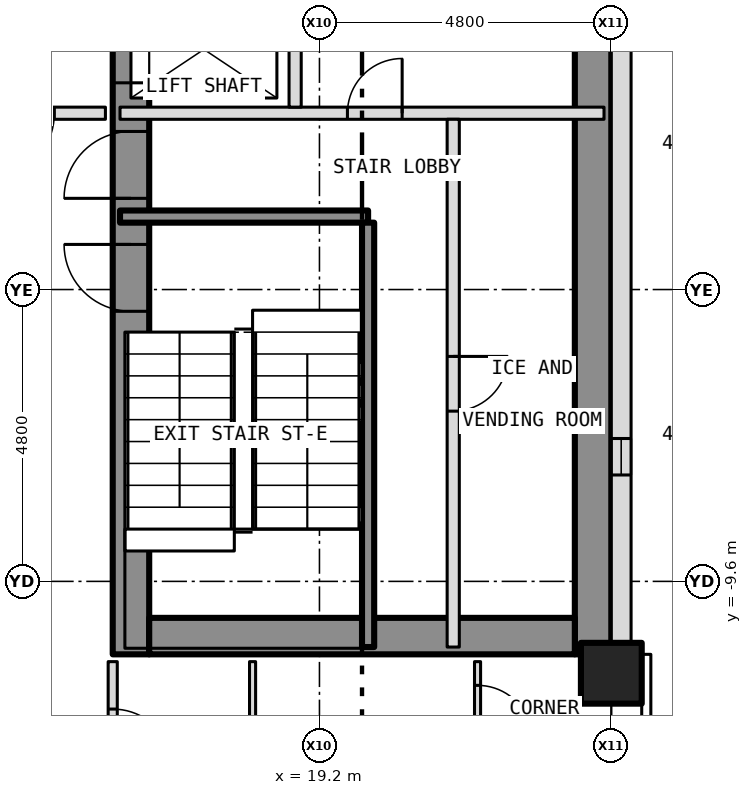
"""IFC4 building model, lengths in metres.
Left out: names, types, materials, properties, quantities, classifications, styles, units other than length and angle.
Written with IfcOpenShell. Run it as: python <this file> out.ifc"""

import sys

from ifc_helpers import new_model, si_unit, direction, frame, frame_2d, origin, origin_2d, place, context, subcontext, project, spatial, rectangle, hollow_rectangle, extrude, element, fill, save


model = new_model("IFC4")
c1 = context("Model", 3, precision=1e-05, world=origin(), true_north=direction((0.0, 1.0)))
c2 = subcontext(c1, "Body", "Model", "MODEL_VIEW")
j1 = project(units=[si_unit("LENGTHUNIT", "METRE"), si_unit("PLANEANGLEUNIT", "RADIAN")], contexts=[c1])
p1 = place(None, origin())
s1 = spatial("IfcSite", under=j1, at=p1, CompositionType="ELEMENT")
p2 = place(p1, origin())
s2 = spatial("IfcBuilding", under=s1, at=p2, CompositionType="ELEMENT")
p3 = place(p2, frame((0.0, 0.0, 53.0)))
s3 = spatial("IfcBuildingStorey", under=s2, at=p3, CompositionType="ELEMENT", Elevation=53.0)
p4 = place(p3, frame((24.0, -11.111, -0.15), z_axis=(0.0, 0.0, 1.0), x_axis=(1.0, 0.0, 0.0)))
e1 = element("IfcColumn", 1, at=p4, inside=s3, PredefinedType="COLUMN", context=c2, shape_type="SweptSolid", body=[
    extrude(hollow_rectangle(XDim=1.0, YDim=1.0, WallThickness=0.06, at=origin_2d()), origin(), (0.0, 0.0, 1.0), 3.5),
])
p5 = place(p3, frame((16.1, -10.8, 0.0), z_axis=(0.0, 0.0, 1.0), x_axis=(0.0, 1.0, 0.0)))
e2 = element("IfcWall", 2, at=p5, inside=s3, PredefinedType="SHEAR", context=c2, shape_type="SweptSolid", body=[
    extrude(rectangle(XDim=21.6, YDim=0.6, at=frame_2d((10.8, 0.0))), origin(), (0.0, 0.0, 1.0), 3.25),
])
p6 = place(p5, frame((9.4, 0.0, 0.0)))
e3 = element("IfcOpeningElement", 3, at=p6, cuts=e2, PredefinedType="OPENING", context=c2, shape_type="SweptSolid", body=[
    extrude(rectangle(XDim=1.1, YDim=2.1, at=frame_2d((0.55, 1.05))), frame((0.0, 0.312, 0.0), z_axis=(0.0, -1.0, 0.0), x_axis=(1.0, 0.0, 0.0)), (0.0, 0.0, 1.0), 0.624),
])
p7 = place(p5, frame((11.5, 0.0, 0.0)))
e4 = element("IfcOpeningElement", 4, at=p7, cuts=e2, PredefinedType="OPENING", context=c2, shape_type="SweptSolid", body=[
    extrude(rectangle(XDim=1.1, YDim=2.1, at=frame_2d((0.55, 1.05))), frame((0.0, 0.312, 0.0), z_axis=(0.0, -1.0, 0.0), x_axis=(1.0, 0.0, 0.0)), (0.0, 0.0, 1.0), 0.624),
])
p8 = place(p5, frame((13.6, 0.0, 0.0)))
e5 = element("IfcOpeningElement", 5, at=p8, cuts=e2, PredefinedType="OPENING", context=c2, shape_type="SweptSolid", body=[
    extrude(rectangle(XDim=1.1, YDim=2.1, at=frame_2d((0.55, 1.05))), frame((0.0, 0.312, 0.0), z_axis=(0.0, -1.0, 0.0), x_axis=(1.0, 0.0, 0.0)), (0.0, 0.0, 1.0), 0.624),
])
p9 = place(p5, frame((15.7, 0.0, 0.0)))
e6 = element("IfcOpeningElement", 6, at=p9, cuts=e2, PredefinedType="OPENING", context=c2, shape_type="SweptSolid", body=[
    extrude(rectangle(XDim=1.1, YDim=2.1, at=frame_2d((0.55, 1.05))), frame((0.0, 0.312, 0.0), z_axis=(0.0, -1.0, 0.0), x_axis=(1.0, 0.0, 0.0)), (0.0, 0.0, 1.0), 0.624),
])
p10 = place(p5, frame((17.8, 0.0, 0.0)))
e7 = element("IfcOpeningElement", 7, at=p10, cuts=e2, PredefinedType="OPENING", context=c2, shape_type="SweptSolid", body=[
    extrude(rectangle(XDim=1.1, YDim=2.1, at=frame_2d((0.55, 1.05))), frame((0.0, 0.312, 0.0), z_axis=(0.0, -1.0, 0.0), x_axis=(1.0, 0.0, 0.0)), (0.0, 0.0, 1.0), 0.624),
])
p11 = place(p5, frame((5.642, 0.0, 0.0)))
e8 = element("IfcOpeningElement", 8, at=p11, cuts=e2, PredefinedType="OPENING", context=c2, shape_type="SweptSolid", body=[
    extrude(rectangle(XDim=1.1, YDim=2.1, at=frame_2d((0.55, 1.05))), frame((0.0, 0.312, 0.0), z_axis=(0.0, -1.0, 0.0), x_axis=(1.0, 0.0, 0.0)), (0.0, 0.0, 1.0), 0.624),
])
p12 = place(p5, frame((7.5, 0.0, 0.0)))
e9 = element("IfcOpeningElement", 9, at=p12, cuts=e2, PredefinedType="OPENING", context=c2, shape_type="SweptSolid", body=[
    extrude(rectangle(XDim=1.1, YDim=2.1, at=frame_2d((0.55, 1.05))), frame((0.0, 0.312, 0.0), z_axis=(0.0, -1.0, 0.0), x_axis=(1.0, 0.0, 0.0)), (0.0, 0.0, 1.0), 0.624),
])
p13 = place(p3, frame((23.7, -10.8, 0.0), z_axis=(0.0, 0.0, 1.0), x_axis=(0.0, 1.0, 0.0)))
e10 = element("IfcWall", 10, at=p13, inside=s3, PredefinedType="SHEAR", context=c2, shape_type="SweptSolid", body=[
    extrude(rectangle(XDim=21.6, YDim=0.6, at=frame_2d((10.8, 0.0))), origin(), (0.0, 0.0, 1.0), 3.25),
])
p14 = place(p3, frame((16.4, -10.5, 0.0), z_axis=(0.0, 0.0, 1.0), x_axis=(1.0, 0.0, 0.0)))
e11 = element("IfcWall", 11, at=p14, inside=s3, PredefinedType="SHEAR", context=c2, shape_type="SweptSolid", body=[
    extrude(rectangle(XDim=7.0, YDim=0.6, at=frame_2d((3.5, 0.0))), origin(), (0.0, 0.0, 1.0), 3.25),
])
p15 = place(p3, frame((24.163, -10.8, 0.0), z_axis=(0.0, 0.0, 1.0), x_axis=(0.0, 1.0, 0.0)))
e12 = element("IfcWall", 12, at=p15, inside=s3, PredefinedType="SOLIDWALL", context=c2, shape_type="SweptSolid", body=[
    extrude(rectangle(XDim=21.6, YDim=0.325, at=frame_2d((10.8, 0.0))), origin(), (0.0, 0.0, 1.0), 3.5),
])
p16 = place(p15, frame((2.95, 0.0, 1.0)))
e13 = element("IfcOpeningElement", 13, at=p16, cuts=e12, PredefinedType="OPENING", context=c2, shape_type="SweptSolid", body=[
    extrude(rectangle(XDim=0.6, YDim=1.5, at=frame_2d((0.3, 0.75))), frame((0.0, 0.175, 0.0), z_axis=(0.0, -1.0, 0.0), x_axis=(1.0, 0.0, 0.0)), (0.0, 0.0, 1.0), 0.349),
])
p17 = place(p3, frame((15.92, -3.6, 0.0), z_axis=(0.0, 0.0, 1.0), x_axis=(1.0, 0.0, 0.0)))
e14 = element("IfcWall", 14, at=p17, inside=s3, PredefinedType="SHEAR", context=c2, shape_type="SweptSolid", body=[
    extrude(rectangle(XDim=4.08, YDim=0.2, at=frame_2d((2.04, 0.0))), origin(), (0.0, 0.0, 1.0), 3.25),
])
p18 = place(p3, frame((12.4, -1.9, 0.0), z_axis=(0.0, 0.0, 1.0), x_axis=(1.0, 0.0, 0.0)))
e15 = element("IfcWall", 15, at=p18, inside=s3, PredefinedType="PARTITIONING", context=c2, shape_type="SweptSolid", body=[
    extrude(rectangle(XDim=3.28, YDim=0.2, at=frame_2d((1.64, 0.0))), origin(), (0.0, 0.0, 1.0), 3.35),
])
p19 = place(p18, frame((1.34, 0.0, 0.0)))
e16 = element("IfcOpeningElement", 16, at=p19, cuts=e15, PredefinedType="OPENING", context=c2, shape_type="SweptSolid", body=[
    extrude(rectangle(XDim=1.1, YDim=2.1, at=frame_2d((0.55, 1.05))), frame((0.0, 0.112, 0.0), z_axis=(0.0, -1.0, 0.0), x_axis=(1.0, 0.0, 0.0)), (0.0, 0.0, 1.0), 0.224),
])
p20 = place(p3, frame((15.92, -1.9, 0.0), z_axis=(0.0, 0.0, 1.0), x_axis=(1.0, 0.0, 0.0)))
e17 = element("IfcWall", 17, at=p20, inside=s3, PredefinedType="PARTITIONING", context=c2, shape_type="SweptSolid", body=[
    extrude(rectangle(XDim=7.96, YDim=0.2, at=frame_2d((3.98, 0.0))), origin(), (0.0, 0.0, 1.0), 3.25),
])
p21 = place(p20, frame((3.74, 0.0, 0.0)))
e18 = element("IfcOpeningElement", 18, at=p21, cuts=e17, PredefinedType="OPENING", context=c2, shape_type="SweptSolid", body=[
    extrude(rectangle(XDim=0.9, YDim=2.1, at=frame_2d((0.45, 1.05))), frame((0.0, 0.112, 0.0), z_axis=(0.0, -1.0, 0.0), x_axis=(1.0, 0.0, 0.0)), (0.0, 0.0, 1.0), 0.224),
])
p22 = place(p3, frame((15.8, -15.725, 0.0), z_axis=(0.0, 0.0, 1.0), x_axis=(0.0, 1.0, 0.0)))
e19 = element("IfcWall", 19, at=p22, inside=s3, PredefinedType="PARTITIONING", context=c2, shape_type="SweptSolid", body=[
    extrude(rectangle(XDim=4.805, YDim=0.15, at=frame_2d((2.403, 0.0))), origin(), (0.0, 0.0, 1.0), 3.35),
])
p23 = place(p22, frame((3.025, 0.0, 0.0)))
e20 = element("IfcOpeningElement", 20, at=p23, cuts=e19, PredefinedType="OPENING", context=c2, shape_type="SweptSolid", body=[
    extrude(rectangle(XDim=1.0, YDim=2.1, at=frame_2d((0.5, 1.05))), frame((0.0, 0.087, 0.0), z_axis=(0.0, -1.0, 0.0), x_axis=(1.0, 0.0, 0.0)), (0.0, 0.0, 1.0), 0.174),
])
p24 = place(p3, frame((18.1, -24.53, 0.0), z_axis=(0.0, 0.0, 1.0), x_axis=(0.0, 1.0, 0.0)))
e21 = element("IfcWall", 21, at=p24, inside=s3, PredefinedType="PARTITIONING", context=c2, shape_type="SweptSolid", body=[
    extrude(rectangle(XDim=13.61, YDim=0.1, at=frame_2d((6.805, 0.0))), origin(), (0.0, 0.0, 1.0), 3.35),
])
p25 = place(p24, frame((6.68, 0.0, 0.0)))
e22 = element("IfcOpeningElement", 22, at=p25, cuts=e21, PredefinedType="OPENING", context=c2, shape_type="SweptSolid", body=[
    extrude(rectangle(XDim=0.9, YDim=2.1, at=frame_2d((0.45, 1.05))), frame((0.0, 0.062, 0.0), z_axis=(0.0, -1.0, 0.0), x_axis=(1.0, 0.0, 0.0)), (0.0, 0.0, 1.0), 0.124),
])
p26 = place(p3, frame((18.8, -1.8, 0.0), z_axis=(0.0, 0.0, 1.0), x_axis=(0.0, 1.0, 0.0)))
e23 = element("IfcWall", 23, at=p26, inside=s3, PredefinedType="PARTITIONING", context=c2, shape_type="SweptSolid", body=[
    extrude(rectangle(XDim=6.15, YDim=0.2, at=frame_2d((3.075, 0.0))), origin(), (0.0, 0.0, 1.0), 3.25),
])
p27 = place(p3, frame((20.0, -10.68, 0.0), z_axis=(0.0, 0.0, 1.0), x_axis=(0.0, 1.0, 0.0)))
e24 = element("IfcWall", 24, at=p27, inside=s3, PredefinedType="SHEAR", context=c2, shape_type="SweptSolid", body=[
    extrude(rectangle(XDim=6.98, YDim=0.2, at=frame_2d((3.49, 0.0))), origin(), (0.0, 0.0, 1.0), 3.25),
])
p28 = place(p3, frame((21.4, -10.68, 0.0), z_axis=(0.0, 0.0, 1.0), x_axis=(0.0, 1.0, 0.0)))
e25 = element("IfcWall", 25, at=p28, inside=s3, PredefinedType="PARTITIONING", context=c2, shape_type="SweptSolid", body=[
    extrude(rectangle(XDim=8.68, YDim=0.2, at=frame_2d((4.34, 0.0))), origin(), (0.0, 0.0, 1.0), 3.25),
])
p29 = place(p28, frame((3.88, 0.0, 0.0)))
e26 = element("IfcOpeningElement", 26, at=p29, cuts=e25, PredefinedType="OPENING", context=c2, shape_type="SweptSolid", body=[
    extrude(rectangle(XDim=0.9, YDim=2.1, at=frame_2d((0.45, 1.05))), frame((0.0, 0.112, 0.0), z_axis=(0.0, -1.0, 0.0), x_axis=(1.0, 0.0, 0.0)), (0.0, 0.0, 1.0), 0.224),
])
p30 = place(p3, frame((21.8, -13.95, 0.0), z_axis=(0.0, 0.0, 1.0), x_axis=(0.0, 1.0, 0.0)))
e27 = element("IfcWall", 27, at=p30, inside=s3, PredefinedType="PARTITIONING", context=c2, shape_type="SweptSolid", body=[
    extrude(rectangle(XDim=3.03, YDim=0.1, at=frame_2d((1.515, 0.0))), origin(), (0.0, 0.0, 1.0), 3.35),
])
p31 = place(p30, frame((1.74, 0.0, 0.0)))
e28 = element("IfcOpeningElement", 28, at=p31, cuts=e27, PredefinedType="OPENING", context=c2, shape_type="SweptSolid", body=[
    extrude(rectangle(XDim=0.9, YDim=2.1, at=frame_2d((0.45, 1.05))), frame((0.0, 0.062, 0.0), z_axis=(0.0, -1.0, 0.0), x_axis=(1.0, 0.0, 0.0)), (0.0, 0.0, 1.0), 0.124),
])
p32 = place(p16, origin())
e29 = element("IfcWindow", 29, at=p32, inside=s3, PartitioningType="SINGLE_PANEL", PredefinedType="WINDOW", context=c2, shape_type="SweptSolid", body=[
    extrude(rectangle(XDim=0.6, YDim=1.5, at=frame_2d((0.3, 0.75))), frame((0.0, -0.073, 0.0), z_axis=(0.0, -1.0, 0.0), x_axis=(1.0, 0.0, 0.0)), (0.0, 0.0, 1.0), 0.06),
])
fill(e13, e29)
p33 = place(p6, origin())
e30 = element("IfcDoor", 30, at=p33, inside=s3, OperationType="SLIDING_TO_LEFT", PredefinedType="DOOR", context=c2, shape_type="SweptSolid", body=[
    extrude(rectangle(XDim=1.1, YDim=2.1, at=frame_2d((0.55, 1.05))), frame((0.0, 0.025, 0.0), z_axis=(0.0, -1.0, 0.0), x_axis=(1.0, 0.0, 0.0)), (0.0, 0.0, 1.0), 0.05),
])
fill(e3, e30)
p34 = place(p11, origin())
e31 = element("IfcDoor", 31, at=p34, inside=s3, OperationType="SINGLE_SWING_RIGHT", PredefinedType="DOOR", context=c2, shape_type="SweptSolid", body=[
    extrude(rectangle(XDim=1.1, YDim=2.1, at=frame_2d((0.55, 1.05))), frame((0.0, 0.025, 0.0), z_axis=(0.0, -1.0, 0.0), x_axis=(1.0, 0.0, 0.0)), (0.0, 0.0, 1.0), 0.05),
])
fill(e8, e31)
p35 = place(p12, origin())
e32 = element("IfcDoor", 32, at=p35, inside=s3, OperationType="SINGLE_SWING_LEFT", PredefinedType="DOOR", context=c2, shape_type="SweptSolid", body=[
    extrude(rectangle(XDim=1.1, YDim=2.1, at=frame_2d((0.55, 1.05))), frame((0.0, 0.025, 0.0), z_axis=(0.0, -1.0, 0.0), x_axis=(1.0, 0.0, 0.0)), (0.0, 0.0, 1.0), 0.05),
])
fill(e9, e32)
p36 = place(p29, origin())
e33 = element("IfcDoor", 33, at=p36, inside=s3, OperationType="SINGLE_SWING_RIGHT", PredefinedType="DOOR", context=c2, shape_type="SweptSolid", body=[
    extrude(rectangle(XDim=0.9, YDim=2.1, at=frame_2d((0.45, 1.05))), frame((0.0, 0.025, 0.0), z_axis=(0.0, -1.0, 0.0), x_axis=(1.0, 0.0, 0.0)), (0.0, 0.0, 1.0), 0.05),
])
fill(e26, e33)
p37 = place(p21, origin())
e34 = element("IfcDoor", 34, at=p37, inside=s3, OperationType="SINGLE_SWING_RIGHT", PredefinedType="DOOR", context=c2, shape_type="SweptSolid", body=[
    extrude(rectangle(XDim=0.9, YDim=2.1, at=frame_2d((0.45, 1.05))), frame((0.0, 0.025, 0.0), z_axis=(0.0, -1.0, 0.0), x_axis=(1.0, 0.0, 0.0)), (0.0, 0.0, 1.0), 0.05),
])
fill(e18, e34)
p38 = place(p19, origin())
e35 = element("IfcDoor", 35, at=p38, inside=s3, OperationType="SINGLE_SWING_LEFT", PredefinedType="DOOR", context=c2, shape_type="SweptSolid", body=[
    extrude(rectangle(XDim=1.1, YDim=2.1, at=frame_2d((0.55, 1.05))), frame((0.0, 0.025, 0.0), z_axis=(0.0, -1.0, 0.0), x_axis=(1.0, 0.0, 0.0)), (0.0, 0.0, 1.0), 0.05),
])
fill(e16, e35)
p39 = place(p23, origin())
e36 = element("IfcDoor", 36, at=p39, inside=s3, OperationType="SINGLE_SWING_LEFT", PredefinedType="DOOR", context=c2, shape_type="SweptSolid", body=[
    extrude(rectangle(XDim=1.0, YDim=2.1, at=frame_2d((0.5, 1.05))), frame((0.0, 0.025, 0.0), z_axis=(0.0, -1.0, 0.0), x_axis=(1.0, 0.0, 0.0)), (0.0, 0.0, 1.0), 0.05),
])
fill(e20, e36)
p40 = place(p31, origin())
e37 = element("IfcDoor", 37, at=p40, inside=s3, OperationType="SINGLE_SWING_LEFT", PredefinedType="DOOR", context=c2, shape_type="SweptSolid", body=[
    extrude(rectangle(XDim=0.9, YDim=2.1, at=frame_2d((0.45, 1.05))), frame((0.0, 0.025, 0.0), z_axis=(0.0, -1.0, 0.0), x_axis=(1.0, 0.0, 0.0)), (0.0, 0.0, 1.0), 0.05),
])
fill(e28, e37)
save(model, sys.argv[1])
